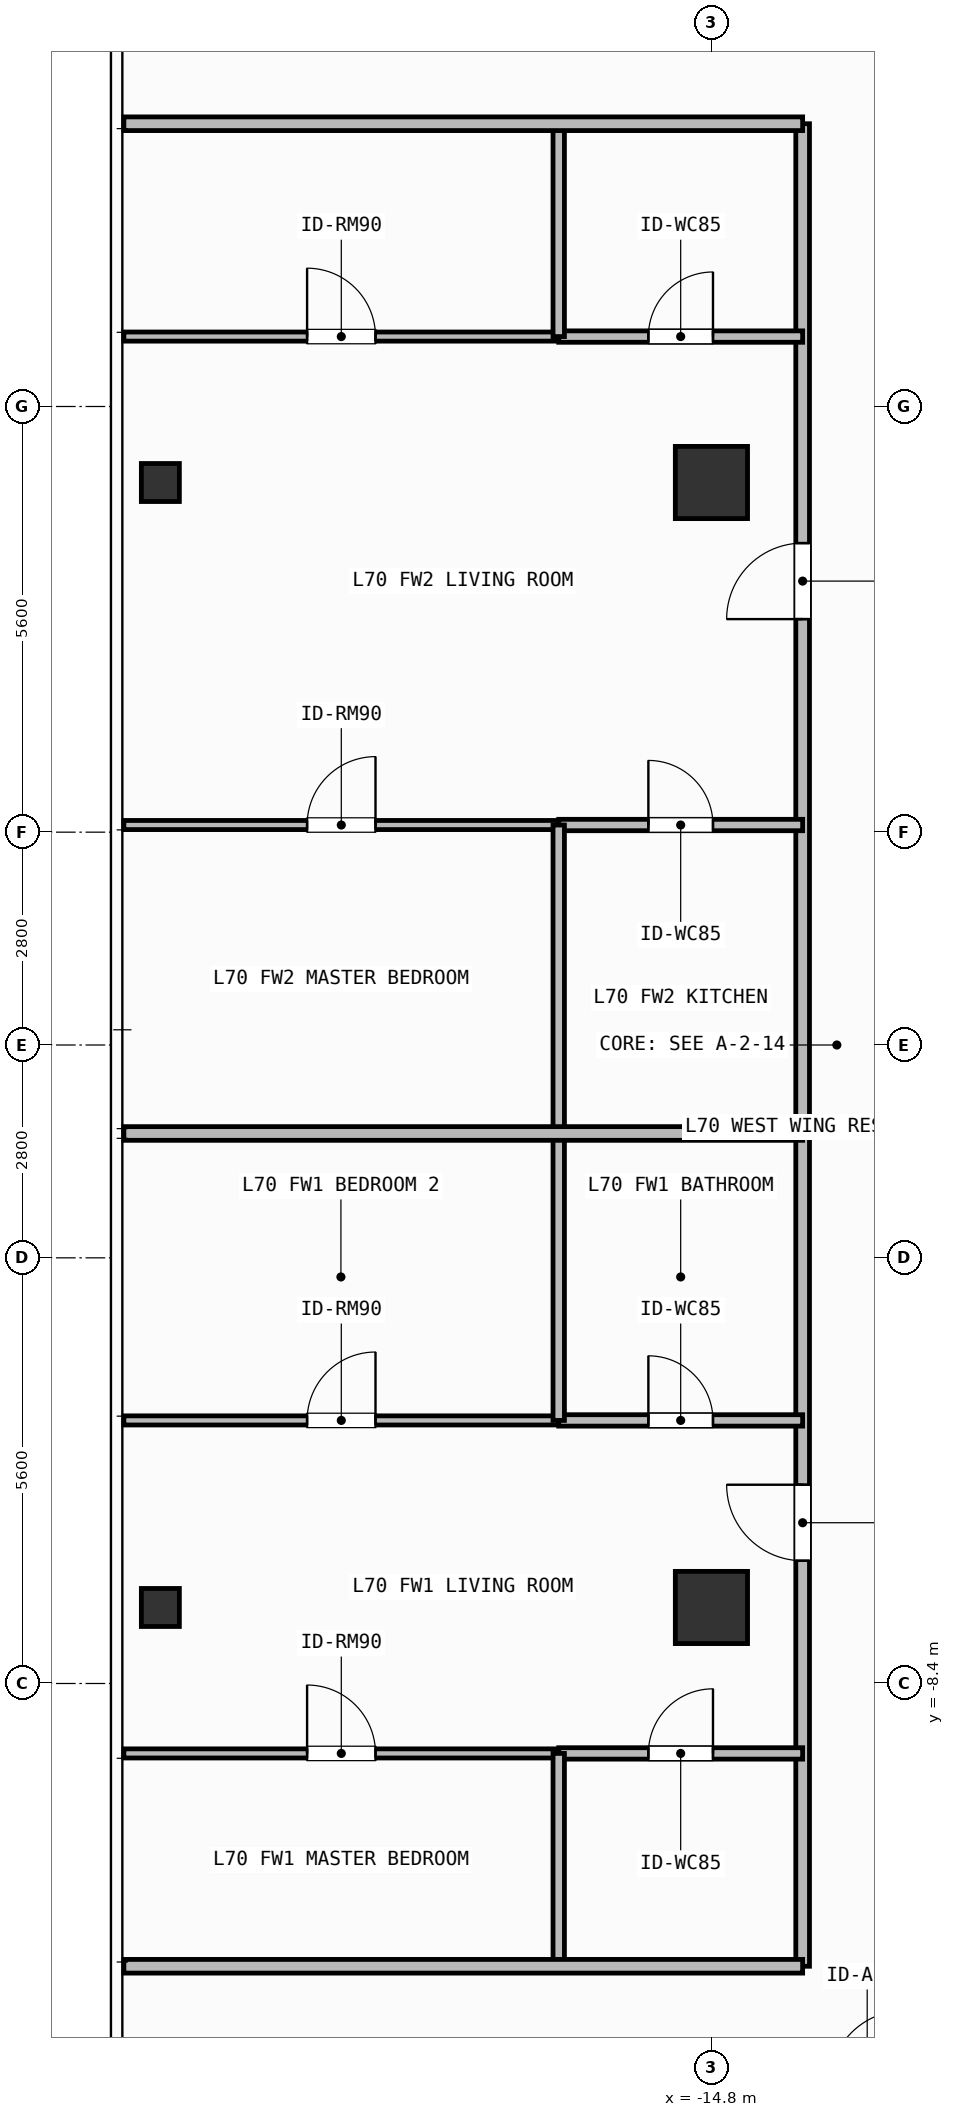
"""IFC4 building model, lengths in metres.
Left out: names, types, materials, properties, quantities, classifications, styles, units other than length and angle.
Written with IfcOpenShell. Run it as: python <this file> out.ifc"""

import sys

from ifc_helpers import new_model, si_unit, direction, frame, frame_2d, origin, origin_2d, place, context, subcontext, project, spatial, rectangle, hollow_rectangle, extrude, element, fill, save


model = new_model("IFC4")
c1 = context("Model", 3, precision=1e-05, world=origin(), true_north=direction((0.0, 1.0)))
c2 = subcontext(c1, "Body", "Model", "MODEL_VIEW")
j1 = project(units=[si_unit("LENGTHUNIT", "METRE"), si_unit("PLANEANGLEUNIT", "RADIAN")], contexts=[c1])
p1 = place(None, origin())
s1 = spatial("IfcSite", under=j1, at=p1, CompositionType="ELEMENT")
p2 = place(p1, origin())
s2 = spatial("IfcBuilding", under=s1, at=p2, CompositionType="ELEMENT")
p3 = place(p2, frame((0.0, 0.0, 285.9)))
s3 = spatial("IfcBuildingStorey", under=s2, at=p3, CompositionType="ELEMENT", Elevation=285.9)
for number, where, z_axis, x_axis in (
    (1, (-14.8, -7.4, 0.0), (0.0, 0.0, 1.0), (1.0, 0.0, 0.0)),
    (2, (-14.8, 7.4, 0.0), (0.0, 0.0, 1.0), (1.0, 0.0, 0.0)),
):
    element("IfcColumn", number, at=place(p3, frame(where, z_axis=z_axis, x_axis=x_axis)), inside=s3, PredefinedType="COLUMN", context=c2, shape_type="SweptSolid", body=[
        extrude(rectangle(XDim=0.95, YDim=0.95, at=origin_2d()), origin(), (0.0, 0.0, 1.0), 3.9),
    ])
for number, where, z_axis, x_axis in (
    (3, (-22.05, -7.4, 0.0), (0.0, 0.0, 1.0), (1.0, 0.0, 0.0)),
    (4, (-22.05, 7.4, 0.0), (0.0, 0.0, 1.0), (1.0, 0.0, 0.0)),
):
    element("IfcColumn", number, at=place(p3, frame(where, z_axis=z_axis, x_axis=x_axis)), inside=s3, PredefinedType="COLUMN", context=c2, shape_type="SweptSolid", body=[
        extrude(hollow_rectangle(XDim=0.5, YDim=0.5, WallThickness=0.025, at=origin_2d()), origin(), (0.0, 0.0, 1.0), 3.9),
    ])
p4 = place(p3, frame((-13.6, -12.12, 0.0), z_axis=(0.0, 0.0, 1.0), x_axis=(0.0, 1.0, 0.0)))
e5 = element("IfcWall", 5, at=p4, inside=s3, PredefinedType="PARTITIONING", context=c2, shape_type="SweptSolid", body=[
    extrude(rectangle(XDim=10.956, YDim=0.18, at=frame_2d((5.478, 0.0))), origin(), (0.0, 0.0, 1.0), 3.68),
])
p5 = place(p4, frame((5.335, 0.0, 0.0)))
e6 = element("IfcOpeningElement", 6, at=p5, cuts=e5, PredefinedType="OPENING", context=c2, shape_type="SweptSolid", body=[
    extrude(rectangle(XDim=1.0, YDim=2.2, at=frame_2d((0.5, 1.1))), frame((0.0, 0.1, 0.0), z_axis=(0.0, -1.0, 0.0), x_axis=(1.0, 0.0, 0.0)), (0.0, 0.0, 1.0), 0.2),
])
p6 = place(p3, frame((-16.809, -4.939, 0.0), z_axis=(0.0, 0.0, 1.0), x_axis=(1.0, 0.0, 0.0)))
e7 = element("IfcWall", 7, at=p6, inside=s3, PredefinedType="PARTITIONING", context=c2, shape_type="SweptSolid", body=[
    extrude(rectangle(XDim=3.209, YDim=0.15, at=frame_2d((1.604, 0.0))), origin(), (0.0, 0.0, 1.0), 3.68),
])
p7 = place(p6, frame((1.179, 0.0, 0.0)))
e8 = element("IfcOpeningElement", 8, at=p7, cuts=e7, PredefinedType="OPENING", context=c2, shape_type="SweptSolid", body=[
    extrude(rectangle(XDim=0.85, YDim=2.1, at=frame_2d((0.425, 1.05))), frame((0.0, 0.085, 0.0), z_axis=(0.0, -1.0, 0.0), x_axis=(1.0, 0.0, 0.0)), (0.0, 0.0, 1.0), 0.17),
])
p8 = place(p3, frame((-16.809, -9.32, 0.0), z_axis=(0.0, 0.0, 1.0), x_axis=(1.0, 0.0, 0.0)))
e9 = element("IfcWall", 9, at=p8, inside=s3, PredefinedType="PARTITIONING", context=c2, shape_type="SweptSolid", body=[
    extrude(rectangle(XDim=3.209, YDim=0.15, at=frame_2d((1.604, 0.0))), origin(), (0.0, 0.0, 1.0), 3.68),
])
p9 = place(p8, frame((1.179, 0.0, 0.0)))
e10 = element("IfcOpeningElement", 10, at=p9, cuts=e9, PredefinedType="OPENING", context=c2, shape_type="SweptSolid", body=[
    extrude(rectangle(XDim=0.85, YDim=2.1, at=frame_2d((0.425, 1.05))), frame((0.0, 0.085, 0.0), z_axis=(0.0, -1.0, 0.0), x_axis=(1.0, 0.0, 0.0)), (0.0, 0.0, 1.0), 0.17),
])
p10 = place(p3, frame((-22.53, -9.32, 0.0), z_axis=(0.0, 0.0, 1.0), x_axis=(1.0, 0.0, 0.0)))
e11 = element("IfcWall", 11, at=p10, inside=s3, PredefinedType="PARTITIONING", context=c2, shape_type="SweptSolid", body=[
    extrude(rectangle(XDim=5.721, YDim=0.12, at=frame_2d((2.86, 0.0))), origin(), (0.0, 0.0, 1.0), 3.68),
])
p11 = place(p10, frame((2.41, 0.0, 0.0)))
e12 = element("IfcOpeningElement", 12, at=p11, cuts=e11, PredefinedType="OPENING", context=c2, shape_type="SweptSolid", body=[
    extrude(rectangle(XDim=0.9, YDim=2.1, at=frame_2d((0.45, 1.05))), frame((0.0, 0.07, 0.0), z_axis=(0.0, -1.0, 0.0), x_axis=(1.0, 0.0, 0.0)), (0.0, 0.0, 1.0), 0.14),
])
p12 = place(p3, frame((-22.53, -4.939, 0.0), z_axis=(0.0, 0.0, 1.0), x_axis=(1.0, 0.0, 0.0)))
e13 = element("IfcWall", 13, at=p12, inside=s3, PredefinedType="PARTITIONING", context=c2, shape_type="SweptSolid", body=[
    extrude(rectangle(XDim=5.721, YDim=0.12, at=frame_2d((2.86, 0.0))), origin(), (0.0, 0.0, 1.0), 3.68),
])
p13 = place(p12, frame((2.41, 0.0, 0.0)))
e14 = element("IfcOpeningElement", 14, at=p13, cuts=e13, PredefinedType="OPENING", context=c2, shape_type="SweptSolid", body=[
    extrude(rectangle(XDim=0.9, YDim=2.1, at=frame_2d((0.45, 1.05))), frame((0.0, 0.07, 0.0), z_axis=(0.0, -1.0, 0.0), x_axis=(1.0, 0.0, 0.0)), (0.0, 0.0, 1.0), 0.14),
])
p14 = place(p3, frame((-13.6, -1.164, 0.0), z_axis=(0.0, 0.0, 1.0), x_axis=(0.0, 1.0, 0.0)))
e15 = element("IfcWall", 15, at=p14, inside=s3, PredefinedType="PARTITIONING", context=c2, shape_type="SweptSolid", body=[
    extrude(rectangle(XDim=13.284, YDim=0.18, at=frame_2d((6.642, 0.0))), origin(), (0.0, 0.0, 1.0), 3.68),
])
p15 = place(p14, frame((6.767, 0.0, 0.0)))
e16 = element("IfcOpeningElement", 16, at=p15, cuts=e15, PredefinedType="OPENING", context=c2, shape_type="SweptSolid", body=[
    extrude(rectangle(XDim=1.0, YDim=2.2, at=frame_2d((0.5, 1.1))), frame((0.0, 0.1, 0.0), z_axis=(0.0, -1.0, 0.0), x_axis=(1.0, 0.0, 0.0)), (0.0, 0.0, 1.0), 0.2),
])
p16 = place(p3, frame((-16.809, 9.32, 0.0), z_axis=(0.0, 0.0, 1.0), x_axis=(1.0, 0.0, 0.0)))
e17 = element("IfcWall", 17, at=p16, inside=s3, PredefinedType="PARTITIONING", context=c2, shape_type="SweptSolid", body=[
    extrude(rectangle(XDim=3.209, YDim=0.15, at=frame_2d((1.604, 0.0))), origin(), (0.0, 0.0, 1.0), 3.68),
])
p17 = place(p16, frame((1.179, 0.0, 0.0)))
e18 = element("IfcOpeningElement", 18, at=p17, cuts=e17, PredefinedType="OPENING", context=c2, shape_type="SweptSolid", body=[
    extrude(rectangle(XDim=0.85, YDim=2.1, at=frame_2d((0.425, 1.05))), frame((0.0, 0.085, 0.0), z_axis=(0.0, -1.0, 0.0), x_axis=(1.0, 0.0, 0.0)), (0.0, 0.0, 1.0), 0.17),
])
p18 = place(p3, frame((-16.809, 2.894, 0.0), z_axis=(0.0, 0.0, 1.0), x_axis=(1.0, 0.0, 0.0)))
e19 = element("IfcWall", 19, at=p18, inside=s3, PredefinedType="PARTITIONING", context=c2, shape_type="SweptSolid", body=[
    extrude(rectangle(XDim=3.209, YDim=0.15, at=frame_2d((1.604, 0.0))), origin(), (0.0, 0.0, 1.0), 3.68),
])
p19 = place(p18, frame((1.179, 0.0, 0.0)))
e20 = element("IfcOpeningElement", 20, at=p19, cuts=e19, PredefinedType="OPENING", context=c2, shape_type="SweptSolid", body=[
    extrude(rectangle(XDim=0.85, YDim=2.1, at=frame_2d((0.425, 1.05))), frame((0.0, 0.085, 0.0), z_axis=(0.0, -1.0, 0.0), x_axis=(1.0, 0.0, 0.0)), (0.0, 0.0, 1.0), 0.17),
])
p20 = place(p3, frame((-22.53, 2.894, 0.0), z_axis=(0.0, 0.0, 1.0), x_axis=(1.0, 0.0, 0.0)))
e21 = element("IfcWall", 21, at=p20, inside=s3, PredefinedType="PARTITIONING", context=c2, shape_type="SweptSolid", body=[
    extrude(rectangle(XDim=5.721, YDim=0.12, at=frame_2d((2.86, 0.0))), origin(), (0.0, 0.0, 1.0), 3.68),
])
p21 = place(p20, frame((2.41, 0.0, 0.0)))
e22 = element("IfcOpeningElement", 22, at=p21, cuts=e21, PredefinedType="OPENING", context=c2, shape_type="SweptSolid", body=[
    extrude(rectangle(XDim=0.9, YDim=2.1, at=frame_2d((0.45, 1.05))), frame((0.0, 0.07, 0.0), z_axis=(0.0, -1.0, 0.0), x_axis=(1.0, 0.0, 0.0)), (0.0, 0.0, 1.0), 0.14),
])
p22 = place(p3, frame((-22.53, 9.32, 0.0), z_axis=(0.0, 0.0, 1.0), x_axis=(1.0, 0.0, 0.0)))
e23 = element("IfcWall", 23, at=p22, inside=s3, PredefinedType="PARTITIONING", context=c2, shape_type="SweptSolid", body=[
    extrude(rectangle(XDim=5.721, YDim=0.12, at=frame_2d((2.86, 0.0))), origin(), (0.0, 0.0, 1.0), 3.68),
])
p23 = place(p22, frame((2.41, 0.0, 0.0)))
e24 = element("IfcOpeningElement", 24, at=p23, cuts=e23, PredefinedType="OPENING", context=c2, shape_type="SweptSolid", body=[
    extrude(rectangle(XDim=0.9, YDim=2.1, at=frame_2d((0.45, 1.05))), frame((0.0, 0.07, 0.0), z_axis=(0.0, -1.0, 0.0), x_axis=(1.0, 0.0, 0.0)), (0.0, 0.0, 1.0), 0.14),
])
p24 = place(p3, frame((-16.809, -12.12, 0.0), z_axis=(0.0, 0.0, 1.0), x_axis=(0.0, 1.0, 0.0)))
e25 = element("IfcWall", 25, at=p24, inside=s3, PredefinedType="PARTITIONING", context=c2, shape_type="SweptSolid", body=[
    extrude(rectangle(XDim=2.8, YDim=0.15, at=frame_2d((1.4, 0.0))), origin(), (0.0, 0.0, 1.0), 3.68),
])
p25 = place(p3, frame((-16.809, -4.939, 0.0), z_axis=(0.0, 0.0, 1.0), x_axis=(0.0, 1.0, 0.0)))
e26 = element("IfcWall", 26, at=p25, inside=s3, PredefinedType="PARTITIONING", context=c2, shape_type="SweptSolid", body=[
    extrude(rectangle(XDim=3.775, YDim=0.15, at=frame_2d((1.887, 0.0))), origin(), (0.0, 0.0, 1.0), 3.68),
])
p26 = place(p3, frame((-16.809, -1.164, 0.0), z_axis=(0.0, 0.0, 1.0), x_axis=(0.0, 1.0, 0.0)))
e27 = element("IfcWall", 27, at=p26, inside=s3, PredefinedType="PARTITIONING", context=c2, shape_type="SweptSolid", body=[
    extrude(rectangle(XDim=4.058, YDim=0.15, at=frame_2d((2.029, 0.0))), origin(), (0.0, 0.0, 1.0), 3.68),
])
p27 = place(p3, frame((-16.809, 9.32, 0.0), z_axis=(0.0, 0.0, 1.0), x_axis=(0.0, 1.0, 0.0)))
e28 = element("IfcWall", 28, at=p27, inside=s3, PredefinedType="PARTITIONING", context=c2, shape_type="SweptSolid", body=[
    extrude(rectangle(XDim=2.8, YDim=0.15, at=frame_2d((1.4, 0.0))), origin(), (0.0, 0.0, 1.0), 3.68),
])
for number, where, z_axis, x_axis in (
    (29, (-22.53, -1.164, 0.0), (0.0, 0.0, 1.0), (1.0, 0.0, 0.0)),
    (30, (-22.53, -12.12, 0.0), (0.0, 0.0, 1.0), (1.0, 0.0, 0.0)),
    (31, (-22.53, 12.12, 0.0), (0.0, 0.0, 1.0), (1.0, 0.0, 0.0)),
):
    element("IfcWall", number, at=place(p3, frame(where, z_axis=z_axis, x_axis=x_axis)), inside=s3, PredefinedType="PARTITIONING", context=c2, shape_type="SweptSolid", body=[
        extrude(rectangle(XDim=8.93, YDim=0.18, at=frame_2d((4.465, 0.0))), origin(), (0.0, 0.0, 1.0), 3.68),
    ])
p28 = place(p5, origin())
e32 = element("IfcDoor", 32, at=p28, inside=s3, OperationType="SINGLE_SWING_RIGHT", PredefinedType="DOOR", context=c2, shape_type="SweptSolid", body=[
    extrude(rectangle(XDim=1.0, YDim=2.2, at=frame_2d((0.5, 1.1))), frame((0.0, 0.025, 0.0), z_axis=(0.0, -1.0, 0.0), x_axis=(1.0, 0.0, 0.0)), (0.0, 0.0, 1.0), 0.05),
])
fill(e6, e32)
p29 = place(p7, origin())
e33 = element("IfcDoor", 33, at=p29, inside=s3, OperationType="SINGLE_SWING_LEFT", PredefinedType="DOOR", context=c2, shape_type="SweptSolid", body=[
    extrude(rectangle(XDim=0.85, YDim=2.1, at=frame_2d((0.425, 1.05))), frame((0.0, 0.025, 0.0), z_axis=(0.0, -1.0, 0.0), x_axis=(1.0, 0.0, 0.0)), (0.0, 0.0, 1.0), 0.05),
])
fill(e8, e33)
p30 = place(p9, origin())
e34 = element("IfcDoor", 34, at=p30, inside=s3, OperationType="SINGLE_SWING_RIGHT", PredefinedType="DOOR", context=c2, shape_type="SweptSolid", body=[
    extrude(rectangle(XDim=0.85, YDim=2.1, at=frame_2d((0.425, 1.05))), frame((0.0, 0.025, 0.0), z_axis=(0.0, -1.0, 0.0), x_axis=(1.0, 0.0, 0.0)), (0.0, 0.0, 1.0), 0.05),
])
fill(e10, e34)
p31 = place(p11, origin())
e35 = element("IfcDoor", 35, at=p31, inside=s3, OperationType="SINGLE_SWING_LEFT", PredefinedType="DOOR", context=c2, shape_type="SweptSolid", body=[
    extrude(rectangle(XDim=0.9, YDim=2.1, at=frame_2d((0.45, 1.05))), frame((0.0, 0.025, 0.0), z_axis=(0.0, -1.0, 0.0), x_axis=(1.0, 0.0, 0.0)), (0.0, 0.0, 1.0), 0.05),
])
fill(e12, e35)
p32 = place(p13, origin())
e36 = element("IfcDoor", 36, at=p32, inside=s3, OperationType="SINGLE_SWING_RIGHT", PredefinedType="DOOR", context=c2, shape_type="SweptSolid", body=[
    extrude(rectangle(XDim=0.9, YDim=2.1, at=frame_2d((0.45, 1.05))), frame((0.0, 0.025, 0.0), z_axis=(0.0, -1.0, 0.0), x_axis=(1.0, 0.0, 0.0)), (0.0, 0.0, 1.0), 0.05),
])
fill(e14, e36)
p33 = place(p15, origin())
e37 = element("IfcDoor", 37, at=p33, inside=s3, OperationType="SINGLE_SWING_LEFT", PredefinedType="DOOR", context=c2, shape_type="SweptSolid", body=[
    extrude(rectangle(XDim=1.0, YDim=2.2, at=frame_2d((0.5, 1.1))), frame((0.0, 0.025, 0.0), z_axis=(0.0, -1.0, 0.0), x_axis=(1.0, 0.0, 0.0)), (0.0, 0.0, 1.0), 0.05),
])
fill(e16, e37)
p34 = place(p17, origin())
e38 = element("IfcDoor", 38, at=p34, inside=s3, OperationType="SINGLE_SWING_RIGHT", PredefinedType="DOOR", context=c2, shape_type="SweptSolid", body=[
    extrude(rectangle(XDim=0.85, YDim=2.1, at=frame_2d((0.425, 1.05))), frame((0.0, 0.025, 0.0), z_axis=(0.0, -1.0, 0.0), x_axis=(1.0, 0.0, 0.0)), (0.0, 0.0, 1.0), 0.05),
])
fill(e18, e38)
p35 = place(p19, origin())
e39 = element("IfcDoor", 39, at=p35, inside=s3, OperationType="SINGLE_SWING_LEFT", PredefinedType="DOOR", context=c2, shape_type="SweptSolid", body=[
    extrude(rectangle(XDim=0.85, YDim=2.1, at=frame_2d((0.425, 1.05))), frame((0.0, 0.025, 0.0), z_axis=(0.0, -1.0, 0.0), x_axis=(1.0, 0.0, 0.0)), (0.0, 0.0, 1.0), 0.05),
])
fill(e20, e39)
p36 = place(p21, origin())
e40 = element("IfcDoor", 40, at=p36, inside=s3, OperationType="SINGLE_SWING_RIGHT", PredefinedType="DOOR", context=c2, shape_type="SweptSolid", body=[
    extrude(rectangle(XDim=0.9, YDim=2.1, at=frame_2d((0.45, 1.05))), frame((0.0, 0.025, 0.0), z_axis=(0.0, -1.0, 0.0), x_axis=(1.0, 0.0, 0.0)), (0.0, 0.0, 1.0), 0.05),
])
fill(e22, e40)
p37 = place(p23, origin())
e41 = element("IfcDoor", 41, at=p37, inside=s3, OperationType="SINGLE_SWING_LEFT", PredefinedType="DOOR", context=c2, shape_type="SweptSolid", body=[
    extrude(rectangle(XDim=0.9, YDim=2.1, at=frame_2d((0.45, 1.05))), frame((0.0, 0.025, 0.0), z_axis=(0.0, -1.0, 0.0), x_axis=(1.0, 0.0, 0.0)), (0.0, 0.0, 1.0), 0.05),
])
fill(e24, e41)
save(model, sys.argv[1])
